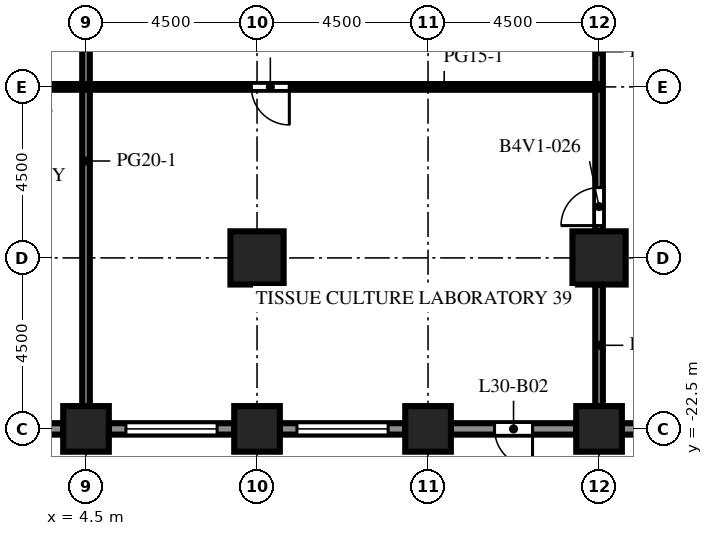
"""IFC4 building model, lengths in metres.
Left out: names, types, materials, properties, quantities, classifications, styles, units other than length and angle.
Written with IfcOpenShell. Run it as: python <this file> out.ifc"""

import sys

from ifc_helpers import new_model, si_unit, direction, frame, frame_2d, origin, origin_2d, place, context, subcontext, project, spatial, rectangle, extrude, element, fill, save


model = new_model("IFC4")
c1 = context("Model", 3, precision=1e-05, world=origin(), true_north=direction((0.0, 1.0)))
c2 = subcontext(c1, "Body", "Model", "MODEL_VIEW")
j1 = project(units=[si_unit("LENGTHUNIT", "METRE"), si_unit("PLANEANGLEUNIT", "RADIAN")], contexts=[c1])
p1 = place(None, origin())
s1 = spatial("IfcSite", under=j1, at=p1, CompositionType="ELEMENT")
p2 = place(p1, origin())
s2 = spatial("IfcBuilding", under=s1, at=p2, CompositionType="ELEMENT")
p3 = place(p2, frame((0.0, 0.0, 133.1)))
s3 = spatial("IfcBuildingStorey", under=s2, at=p3, CompositionType="ELEMENT", Elevation=133.1)
for number, where, z_axis, x_axis in (
    (1, (4.5, -22.5, 0.0), (0.0, 0.0, 1.0), (1.0, 0.0, 0.0)),
    (2, (9.0, -22.5, 0.0), (0.0, 0.0, 1.0), (1.0, 0.0, 0.0)),
    (3, (13.5, -22.5, 0.0), (0.0, 0.0, 1.0), (1.0, 0.0, 0.0)),
    (4, (18.0, -22.5, 0.0), (0.0, 0.0, 1.0), (1.0, 0.0, 0.0)),
):
    element("IfcColumn", number, at=place(p3, frame(where, z_axis=z_axis, x_axis=x_axis)), inside=s3, PredefinedType="COLUMN", context=c2, shape_type="SweptSolid", body=[
        extrude(rectangle(XDim=1.2, YDim=1.2, at=origin_2d()), origin(), (0.0, 0.0, 1.0), 4.1),
    ])
for number, where, z_axis, x_axis in (
    (5, (9.0, -18.0, 0.0), (0.0, 0.0, 1.0), (1.0, 0.0, 0.0)),
    (6, (18.0, -18.0, 0.0), (0.0, 0.0, 1.0), (1.0, 0.0, 0.0)),
):
    element("IfcColumn", number, at=place(p3, frame(where, z_axis=z_axis, x_axis=x_axis)), inside=s3, PredefinedType="COLUMN", context=c2, shape_type="SweptSolid", body=[
        extrude(rectangle(XDim=1.4, YDim=1.4, at=origin_2d()), origin(), (0.0, 0.0, 1.0), 4.1),
    ])
p4 = place(p3, frame((3.9, -22.5, 0.0), z_axis=(0.0, 0.0, 1.0), x_axis=(-1.0, 0.0, 0.0)))
e7 = element("IfcWall", 7, at=p4, inside=s3, PredefinedType="SOLIDWALL", context=c2, shape_type="SweptSolid", body=[
    extrude(rectangle(XDim=3.3, YDim=0.3, at=frame_2d((1.65, 0.0))), origin(), (0.0, 0.0, 1.0), 2.75),
])
p5 = place(p4, frame((0.45, 0.0, 0.8)))
e8 = element("IfcOpeningElement", 8, at=p5, cuts=e7, PredefinedType="OPENING", context=c2, shape_type="SweptSolid", body=[
    extrude(rectangle(XDim=2.4, YDim=1.7, at=frame_2d((1.2, 0.85))), frame((0.0, 0.16, 0.0), z_axis=(0.0, -1.0, 0.0), x_axis=(1.0, 0.0, 0.0)), (0.0, 0.0, 1.0), 0.32),
])
p6 = place(p3, frame((8.4, -22.5, 0.0), z_axis=(0.0, 0.0, 1.0), x_axis=(-1.0, 0.0, 0.0)))
e9 = element("IfcWall", 9, at=p6, inside=s3, PredefinedType="SOLIDWALL", context=c2, shape_type="SweptSolid", body=[
    extrude(rectangle(XDim=3.3, YDim=0.3, at=frame_2d((1.65, 0.0))), origin(), (0.0, 0.0, 1.0), 2.75),
])
p7 = place(p6, frame((0.45, 0.0, 0.8)))
e10 = element("IfcOpeningElement", 10, at=p7, cuts=e9, PredefinedType="OPENING", context=c2, shape_type="SweptSolid", body=[
    extrude(rectangle(XDim=2.4, YDim=1.7, at=frame_2d((1.2, 0.85))), frame((0.0, 0.16, 0.0), z_axis=(0.0, -1.0, 0.0), x_axis=(1.0, 0.0, 0.0)), (0.0, 0.0, 1.0), 0.32),
])
p8 = place(p3, frame((12.9, -22.5, 0.0), z_axis=(0.0, 0.0, 1.0), x_axis=(-1.0, 0.0, 0.0)))
e11 = element("IfcWall", 11, at=p8, inside=s3, PredefinedType="SOLIDWALL", context=c2, shape_type="SweptSolid", body=[
    extrude(rectangle(XDim=3.3, YDim=0.3, at=frame_2d((1.65, 0.0))), origin(), (0.0, 0.0, 1.0), 2.75),
])
p9 = place(p8, frame((0.45, 0.0, 0.8)))
e12 = element("IfcOpeningElement", 12, at=p9, cuts=e11, PredefinedType="OPENING", context=c2, shape_type="SweptSolid", body=[
    extrude(rectangle(XDim=2.4, YDim=1.7, at=frame_2d((1.2, 0.85))), frame((0.0, 0.16, 0.0), z_axis=(0.0, -1.0, 0.0), x_axis=(1.0, 0.0, 0.0)), (0.0, 0.0, 1.0), 0.32),
])
p10 = place(p3, frame((17.4, -22.5, 0.0), z_axis=(0.0, 0.0, 1.0), x_axis=(-1.0, 0.0, 0.0)))
e13 = element("IfcWall", 13, at=p10, inside=s3, PredefinedType="SOLIDWALL", context=c2, shape_type="SweptSolid", body=[
    extrude(rectangle(XDim=3.3, YDim=0.3, at=frame_2d((1.65, 0.0))), origin(), (0.0, 0.0, 1.0), 2.75),
])
p11 = place(p10, frame((1.15, 0.0, 0.0)))
e14 = element("IfcOpeningElement", 14, at=p11, cuts=e13, PredefinedType="OPENING", context=c2, shape_type="SweptSolid", body=[
    extrude(rectangle(XDim=1.0, YDim=2.2, at=frame_2d((0.5, 1.1))), frame((0.0, 0.16, 0.0), z_axis=(0.0, -1.0, 0.0), x_axis=(1.0, 0.0, 0.0)), (0.0, 0.0, 1.0), 0.32),
])
p12 = place(p3, frame((21.9, -22.5, 0.0), z_axis=(0.0, 0.0, 1.0), x_axis=(-1.0, 0.0, 0.0)))
e15 = element("IfcWall", 15, at=p12, inside=s3, PredefinedType="SOLIDWALL", context=c2, shape_type="SweptSolid", body=[
    extrude(rectangle(XDim=3.3, YDim=0.3, at=frame_2d((1.65, 0.0))), origin(), (0.0, 0.0, 1.0), 2.75),
])
p13 = place(p12, frame((1.575, 0.0, 0.8)))
e16 = element("IfcOpeningElement", 16, at=p13, cuts=e15, PredefinedType="OPENING", context=c2, shape_type="SweptSolid", body=[
    extrude(rectangle(XDim=1.2, YDim=1.7, at=frame_2d((0.6, 0.85))), frame((0.0, 0.16, 0.0), z_axis=(0.0, -1.0, 0.0), x_axis=(1.0, 0.0, 0.0)), (0.0, 0.0, 1.0), 0.32),
])
p14 = place(p3, frame((4.5, -21.9, 0.0), z_axis=(0.0, 0.0, 1.0), x_axis=(0.0, 1.0, 0.0)))
e17 = element("IfcWall", 17, at=p14, inside=s3, PredefinedType="PARTITIONING", context=c2, shape_type="SweptSolid", body=[
    extrude(rectangle(XDim=12.9, YDim=0.2, at=frame_2d((6.45, 0.0))), origin(), (0.0, 0.0, 1.0), 3.65),
])
p15 = place(p3, frame((18.0, -21.9, 0.0), z_axis=(0.0, 0.0, 1.0), x_axis=(0.0, 1.0, 0.0)))
e18 = element("IfcWall", 18, at=p15, inside=s3, PredefinedType="PARTITIONING", context=c2, shape_type="SweptSolid", body=[
    extrude(rectangle(XDim=3.2, YDim=0.2, at=frame_2d((1.6, 0.0))), origin(), (0.0, 0.0, 1.0), 3.65),
])
p16 = place(p3, frame((18.0, -17.3, 0.0), z_axis=(0.0, 0.0, 1.0), x_axis=(0.0, 1.0, 0.0)))
e19 = element("IfcWall", 19, at=p16, inside=s3, PredefinedType="PARTITIONING", context=c2, shape_type="SweptSolid", body=[
    extrude(rectangle(XDim=8.3, YDim=0.2, at=frame_2d((4.15, 0.0))), origin(), (0.0, 0.0, 1.0), 3.65),
])
p17 = place(p16, frame((0.15, 0.0, 0.0)))
e20 = element("IfcOpeningElement", 20, at=p17, cuts=e19, PredefinedType="OPENING", context=c2, shape_type="SweptSolid", body=[
    extrude(rectangle(XDim=1.0, YDim=2.1, at=frame_2d((0.5, 1.05))), frame((0.0, 0.11, 0.0), z_axis=(0.0, -1.0, 0.0), x_axis=(1.0, 0.0, 0.0)), (0.0, 0.0, 1.0), 0.22),
])
p18 = place(p3, frame((-10.5, -13.5, 0.0), z_axis=(0.0, 0.0, 1.0), x_axis=(1.0, 0.0, 0.0)))
e21 = element("IfcWall", 21, at=p18, inside=s3, PredefinedType="PARTITIONING", context=c2, shape_type="SweptSolid", body=[
    extrude(rectangle(XDim=28.5, YDim=0.15, at=frame_2d((14.25, 0.0))), origin(), (0.0, 0.0, 1.0), 3.65),
])
p19 = place(p18, frame((3.6, 0.0, 0.0)))
e22 = element("IfcOpeningElement", 22, at=p19, cuts=e21, PredefinedType="OPENING", context=c2, shape_type="SweptSolid", body=[
    extrude(rectangle(XDim=1.0, YDim=2.1, at=frame_2d((0.5, 1.05))), frame((0.0, 0.085, 0.0), z_axis=(0.0, -1.0, 0.0), x_axis=(1.0, 0.0, 0.0)), (0.0, 0.0, 1.0), 0.17),
])
p20 = place(p18, frame((12.6, 0.0, 0.0)))
e23 = element("IfcOpeningElement", 23, at=p20, cuts=e21, PredefinedType="OPENING", context=c2, shape_type="SweptSolid", body=[
    extrude(rectangle(XDim=1.0, YDim=2.1, at=frame_2d((0.5, 1.05))), frame((0.0, 0.085, 0.0), z_axis=(0.0, -1.0, 0.0), x_axis=(1.0, 0.0, 0.0)), (0.0, 0.0, 1.0), 0.17),
])
p21 = place(p18, frame((19.35, 0.0, 0.0)))
e24 = element("IfcOpeningElement", 24, at=p21, cuts=e21, PredefinedType="OPENING", context=c2, shape_type="SweptSolid", body=[
    extrude(rectangle(XDim=1.0, YDim=2.1, at=frame_2d((0.5, 1.05))), frame((0.0, 0.085, 0.0), z_axis=(0.0, -1.0, 0.0), x_axis=(1.0, 0.0, 0.0)), (0.0, 0.0, 1.0), 0.17),
])
p22 = place(p7, origin())
e25 = element("IfcWindow", 25, at=p22, inside=s3, PartitioningType="SINGLE_PANEL", PredefinedType="WINDOW", context=c2, shape_type="SweptSolid", body=[
    extrude(rectangle(XDim=2.4, YDim=1.7, at=frame_2d((1.2, 0.85))), frame((0.0, 0.03, 0.0), z_axis=(0.0, -1.0, 0.0), x_axis=(1.0, 0.0, 0.0)), (0.0, 0.0, 1.0), 0.06),
])
fill(e10, e25)
p23 = place(p9, origin())
e26 = element("IfcWindow", 26, at=p23, inside=s3, PartitioningType="SINGLE_PANEL", PredefinedType="WINDOW", context=c2, shape_type="SweptSolid", body=[
    extrude(rectangle(XDim=2.4, YDim=1.7, at=frame_2d((1.2, 0.85))), frame((0.0, 0.03, 0.0), z_axis=(0.0, -1.0, 0.0), x_axis=(1.0, 0.0, 0.0)), (0.0, 0.0, 1.0), 0.06),
])
fill(e12, e26)
p24 = place(p11, origin())
e27 = element("IfcDoor", 27, at=p24, inside=s3, OperationType="SINGLE_SWING_LEFT", PredefinedType="DOOR", context=c2, shape_type="SweptSolid", body=[
    extrude(rectangle(XDim=1.0, YDim=2.2, at=frame_2d((0.5, 1.1))), frame((0.0, 0.025, 0.0), z_axis=(0.0, -1.0, 0.0), x_axis=(1.0, 0.0, 0.0)), (0.0, 0.0, 1.0), 0.05),
])
fill(e14, e27)
p25 = place(p21, origin())
e28 = element("IfcDoor", 28, at=p25, inside=s3, OperationType="SINGLE_SWING_RIGHT", PredefinedType="DOOR", context=c2, shape_type="SweptSolid", body=[
    extrude(rectangle(XDim=1.0, YDim=2.1, at=frame_2d((0.5, 1.05))), frame((0.0, 0.025, 0.0), z_axis=(0.0, -1.0, 0.0), x_axis=(1.0, 0.0, 0.0)), (0.0, 0.0, 1.0), 0.05),
])
fill(e24, e28)
p26 = place(p17, origin())
e29 = element("IfcDoor", 29, at=p26, inside=s3, OperationType="SINGLE_SWING_LEFT", PredefinedType="DOOR", context=c2, shape_type="SweptSolid", body=[
    extrude(rectangle(XDim=1.0, YDim=2.1, at=frame_2d((0.5, 1.05))), frame((0.0, 0.025, 0.0), z_axis=(0.0, -1.0, 0.0), x_axis=(1.0, 0.0, 0.0)), (0.0, 0.0, 1.0), 0.05),
])
fill(e20, e29)
save(model, sys.argv[1])
